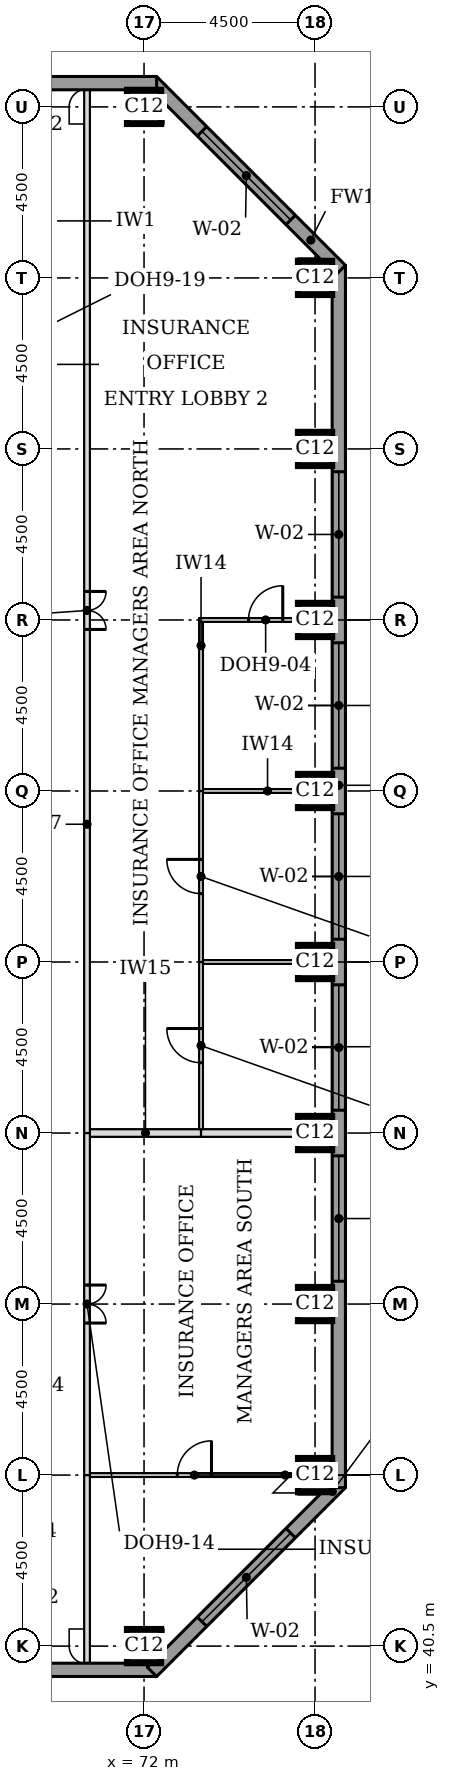
"""IFC4 building model, lengths in metres.
Left out: names, types, materials, properties, quantities, classifications, styles, units other than length and angle.
Written with IfcOpenShell. Run it as: python <this file> out.ifc"""

import sys

from ifc_helpers import new_model, si_unit, direction, frame, frame_2d, origin, origin_2d, place, context, subcontext, project, spatial, rectangle, extrude, element, fill, save


model = new_model("IFC4")
c1 = context("Model", 3, precision=1e-05, world=origin(), true_north=direction((0.0, 1.0)))
c2 = subcontext(c1, "Body", "Model", "MODEL_VIEW")
j1 = project(units=[si_unit("LENGTHUNIT", "METRE"), si_unit("PLANEANGLEUNIT", "RADIAN")], contexts=[c1])
p1 = place(None, origin())
s1 = spatial("IfcSite", under=j1, at=p1, CompositionType="ELEMENT")
p2 = place(p1, origin())
s2 = spatial("IfcBuilding", under=s1, at=p2, CompositionType="ELEMENT")
p3 = place(p2, frame((0.0, 0.0, 219.3)))
s3 = spatial("IfcBuildingStorey", under=s2, at=p3, CompositionType="ELEMENT", Elevation=219.3)
for number, where, z_axis, x_axis in (
    (1, (72.0, 40.5, 0.0), (0.0, 0.0, 1.0), (1.0, 0.0, 0.0)),
    (2, (76.5, 45.0, 0.0), (0.0, 0.0, 1.0), (1.0, 0.0, 0.0)),
    (3, (76.5, 49.5, 0.0), (0.0, 0.0, 1.0), (1.0, 0.0, 0.0)),
    (4, (76.5, 54.0, 0.0), (0.0, 0.0, 1.0), (1.0, 0.0, 0.0)),
    (5, (76.5, 58.5, 0.0), (0.0, 0.0, 1.0), (1.0, 0.0, 0.0)),
    (6, (76.5, 63.0, 0.0), (0.0, 0.0, 1.0), (1.0, 0.0, 0.0)),
    (7, (76.5, 67.5, 0.0), (0.0, 0.0, 1.0), (1.0, 0.0, 0.0)),
    (8, (76.5, 72.0, 0.0), (0.0, 0.0, 1.0), (1.0, 0.0, 0.0)),
    (9, (76.5, 76.5, 0.0), (0.0, 0.0, 1.0), (1.0, 0.0, 0.0)),
    (10, (72.0, 81.0, 0.0), (0.0, 0.0, 1.0), (1.0, 0.0, 0.0)),
):
    element("IfcColumn", number, at=place(p3, frame(where, z_axis=z_axis, x_axis=x_axis)), inside=s3, PredefinedType="COLUMN", context=c2, shape_type="SweptSolid", body=[
        extrude(rectangle(XDim=0.9, YDim=0.9, at=origin_2d()), origin(), (0.0, 0.0, 1.0), 3.7),
    ])
p4 = place(p3, frame((36.0, 39.875, 0.0), z_axis=(0.0, 0.0, 1.0), x_axis=(1.0, 0.0, 0.0)))
e11 = element("IfcWall", 11, at=p4, inside=s3, PredefinedType="STANDARD", context=c2, shape_type="SweptSolid", body=[
    extrude(rectangle(XDim=36.331, YDim=0.35, at=frame_2d((18.166, 0.0))), origin(), (0.0, 0.0, 1.0), 3.525),
])
p5 = place(p4, frame((5.1, 0.0, 0.9)))
e12 = element("IfcOpeningElement", 12, at=p5, cuts=e11, PredefinedType="OPENING", context=c2, shape_type="SweptSolid", body=[
    extrude(rectangle(XDim=3.3, YDim=1.9, at=frame_2d((1.65, 0.95))), frame((0.0, 0.185, 0.0), z_axis=(0.0, -1.0, 0.0), x_axis=(1.0, 0.0, 0.0)), (0.0, 0.0, 1.0), 0.37),
])
p6 = place(p4, frame((9.6, 0.0, 0.9)))
e13 = element("IfcOpeningElement", 13, at=p6, cuts=e11, PredefinedType="OPENING", context=c2, shape_type="SweptSolid", body=[
    extrude(rectangle(XDim=3.3, YDim=1.9, at=frame_2d((1.65, 0.95))), frame((0.0, 0.185, 0.0), z_axis=(0.0, -1.0, 0.0), x_axis=(1.0, 0.0, 0.0)), (0.0, 0.0, 1.0), 0.37),
])
p7 = place(p4, frame((14.1, 0.0, 0.9)))
e14 = element("IfcOpeningElement", 14, at=p7, cuts=e11, PredefinedType="OPENING", context=c2, shape_type="SweptSolid", body=[
    extrude(rectangle(XDim=3.3, YDim=1.9, at=frame_2d((1.65, 0.95))), frame((0.0, 0.185, 0.0), z_axis=(0.0, -1.0, 0.0), x_axis=(1.0, 0.0, 0.0)), (0.0, 0.0, 1.0), 0.37),
])
p8 = place(p4, frame((18.6, 0.0, 0.9)))
e15 = element("IfcOpeningElement", 15, at=p8, cuts=e11, PredefinedType="OPENING", context=c2, shape_type="SweptSolid", body=[
    extrude(rectangle(XDim=3.3, YDim=1.9, at=frame_2d((1.65, 0.95))), frame((0.0, 0.185, 0.0), z_axis=(0.0, -1.0, 0.0), x_axis=(1.0, 0.0, 0.0)), (0.0, 0.0, 1.0), 0.37),
])
p9 = place(p4, frame((23.1, 0.0, 0.9)))
e16 = element("IfcOpeningElement", 16, at=p9, cuts=e11, PredefinedType="OPENING", context=c2, shape_type="SweptSolid", body=[
    extrude(rectangle(XDim=3.3, YDim=1.9, at=frame_2d((1.65, 0.95))), frame((0.0, 0.185, 0.0), z_axis=(0.0, -1.0, 0.0), x_axis=(1.0, 0.0, 0.0)), (0.0, 0.0, 1.0), 0.37),
])
p10 = place(p4, frame((27.6, 0.0, 0.9)))
e17 = element("IfcOpeningElement", 17, at=p10, cuts=e11, PredefinedType="OPENING", context=c2, shape_type="SweptSolid", body=[
    extrude(rectangle(XDim=3.3, YDim=1.9, at=frame_2d((1.65, 0.95))), frame((0.0, 0.185, 0.0), z_axis=(0.0, -1.0, 0.0), x_axis=(1.0, 0.0, 0.0)), (0.0, 0.0, 1.0), 0.37),
])
p11 = place(p3, frame((72.208, 39.824, 0.0), z_axis=(0.0, 0.0, 1.0), x_axis=(0.707106781187, 0.707106781187, 0.0)))
e18 = element("IfcWall", 18, at=p11, inside=s3, PredefinedType="STANDARD", context=c2, shape_type="SweptSolid", body=[
    extrude(rectangle(XDim=7.027, YDim=0.35, at=frame_2d((3.513, 0.0))), origin(), (0.0, 0.0, 1.0), 3.525),
])
p12 = place(p11, frame((1.863, 0.0, 0.9)))
e19 = element("IfcOpeningElement", 19, at=p12, cuts=e18, PredefinedType="OPENING", context=c2, shape_type="SweptSolid", body=[
    extrude(rectangle(XDim=3.3, YDim=1.9, at=frame_2d((1.65, 0.95))), frame((0.0, 0.185, 0.0), z_axis=(0.0, -1.0, 0.0), x_axis=(1.0, 0.0, 0.0)), (0.0, 0.0, 1.0), 0.37),
])
p13 = place(p3, frame((77.125, 44.669, 0.0), z_axis=(0.0, 0.0, 1.0), x_axis=(0.0, 1.0, 0.0)))
e20 = element("IfcWall", 20, at=p13, inside=s3, PredefinedType="STANDARD", context=c2, shape_type="SweptSolid", body=[
    extrude(rectangle(XDim=32.163, YDim=0.35, at=frame_2d((16.081, 0.0))), origin(), (0.0, 0.0, 1.0), 3.525),
])
p14 = place(p13, frame((5.431, 0.0, 0.9)))
e21 = element("IfcOpeningElement", 21, at=p14, cuts=e20, PredefinedType="OPENING", context=c2, shape_type="SweptSolid", body=[
    extrude(rectangle(XDim=3.3, YDim=1.9, at=frame_2d((1.65, 0.95))), frame((0.0, 0.185, 0.0), z_axis=(0.0, -1.0, 0.0), x_axis=(1.0, 0.0, 0.0)), (0.0, 0.0, 1.0), 0.37),
])
p15 = place(p13, frame((9.931, 0.0, 0.9)))
e22 = element("IfcOpeningElement", 22, at=p15, cuts=e20, PredefinedType="OPENING", context=c2, shape_type="SweptSolid", body=[
    extrude(rectangle(XDim=3.3, YDim=1.9, at=frame_2d((1.65, 0.95))), frame((0.0, 0.185, 0.0), z_axis=(0.0, -1.0, 0.0), x_axis=(1.0, 0.0, 0.0)), (0.0, 0.0, 1.0), 0.37),
])
p16 = place(p13, frame((14.431, 0.0, 0.9)))
e23 = element("IfcOpeningElement", 23, at=p16, cuts=e20, PredefinedType="OPENING", context=c2, shape_type="SweptSolid", body=[
    extrude(rectangle(XDim=3.3, YDim=1.9, at=frame_2d((1.65, 0.95))), frame((0.0, 0.185, 0.0), z_axis=(0.0, -1.0, 0.0), x_axis=(1.0, 0.0, 0.0)), (0.0, 0.0, 1.0), 0.37),
])
p17 = place(p13, frame((18.931, 0.0, 0.9)))
e24 = element("IfcOpeningElement", 24, at=p17, cuts=e20, PredefinedType="OPENING", context=c2, shape_type="SweptSolid", body=[
    extrude(rectangle(XDim=3.3, YDim=1.9, at=frame_2d((1.65, 0.95))), frame((0.0, 0.185, 0.0), z_axis=(0.0, -1.0, 0.0), x_axis=(1.0, 0.0, 0.0)), (0.0, 0.0, 1.0), 0.37),
])
p18 = place(p13, frame((23.431, 0.0, 0.9)))
e25 = element("IfcOpeningElement", 25, at=p18, cuts=e20, PredefinedType="OPENING", context=c2, shape_type="SweptSolid", body=[
    extrude(rectangle(XDim=3.3, YDim=1.9, at=frame_2d((1.65, 0.95))), frame((0.0, 0.185, 0.0), z_axis=(0.0, -1.0, 0.0), x_axis=(1.0, 0.0, 0.0)), (0.0, 0.0, 1.0), 0.37),
])
p19 = place(p3, frame((77.176, 76.708, 0.0), z_axis=(0.0, 0.0, 1.0), x_axis=(-0.707106781187, 0.707106781187, 0.0)))
e26 = element("IfcWall", 26, at=p19, inside=s3, PredefinedType="STANDARD", context=c2, shape_type="SweptSolid", body=[
    extrude(rectangle(XDim=7.027, YDim=0.35, at=frame_2d((3.513, 0.0))), origin(), (0.0, 0.0, 1.0), 3.525),
])
p20 = place(p19, frame((1.863, 0.0, 0.9)))
e27 = element("IfcOpeningElement", 27, at=p20, cuts=e26, PredefinedType="OPENING", context=c2, shape_type="SweptSolid", body=[
    extrude(rectangle(XDim=3.3, YDim=1.9, at=frame_2d((1.65, 0.95))), frame((0.0, 0.185, 0.0), z_axis=(0.0, -1.0, 0.0), x_axis=(1.0, 0.0, 0.0)), (0.0, 0.0, 1.0), 0.37),
])
p21 = place(p3, frame((72.331, 81.625, 0.0), z_axis=(0.0, 0.0, 1.0), x_axis=(-1.0, 0.0, 0.0)))
e28 = element("IfcWall", 28, at=p21, inside=s3, PredefinedType="STANDARD", context=c2, shape_type="SweptSolid", body=[
    extrude(rectangle(XDim=32.163, YDim=0.35, at=frame_2d((16.081, 0.0))), origin(), (0.0, 0.0, 1.0), 3.525),
])
p22 = place(p21, frame((5.431, 0.0, 0.9)))
e29 = element("IfcOpeningElement", 29, at=p22, cuts=e28, PredefinedType="OPENING", context=c2, shape_type="SweptSolid", body=[
    extrude(rectangle(XDim=3.3, YDim=1.9, at=frame_2d((1.65, 0.95))), frame((0.0, 0.185, 0.0), z_axis=(0.0, -1.0, 0.0), x_axis=(1.0, 0.0, 0.0)), (0.0, 0.0, 1.0), 0.37),
])
p23 = place(p21, frame((9.931, 0.0, 0.9)))
e30 = element("IfcOpeningElement", 30, at=p23, cuts=e28, PredefinedType="OPENING", context=c2, shape_type="SweptSolid", body=[
    extrude(rectangle(XDim=3.3, YDim=1.9, at=frame_2d((1.65, 0.95))), frame((0.0, 0.185, 0.0), z_axis=(0.0, -1.0, 0.0), x_axis=(1.0, 0.0, 0.0)), (0.0, 0.0, 1.0), 0.37),
])
p24 = place(p21, frame((14.431, 0.0, 0.9)))
e31 = element("IfcOpeningElement", 31, at=p24, cuts=e28, PredefinedType="OPENING", context=c2, shape_type="SweptSolid", body=[
    extrude(rectangle(XDim=3.3, YDim=1.9, at=frame_2d((1.65, 0.95))), frame((0.0, 0.185, 0.0), z_axis=(0.0, -1.0, 0.0), x_axis=(1.0, 0.0, 0.0)), (0.0, 0.0, 1.0), 0.37),
])
p25 = place(p21, frame((18.931, 0.0, 0.9)))
e32 = element("IfcOpeningElement", 32, at=p25, cuts=e28, PredefinedType="OPENING", context=c2, shape_type="SweptSolid", body=[
    extrude(rectangle(XDim=3.3, YDim=1.9, at=frame_2d((1.65, 0.95))), frame((0.0, 0.185, 0.0), z_axis=(0.0, -1.0, 0.0), x_axis=(1.0, 0.0, 0.0)), (0.0, 0.0, 1.0), 0.37),
])
p26 = place(p21, frame((23.431, 0.0, 0.9)))
e33 = element("IfcOpeningElement", 33, at=p26, cuts=e28, PredefinedType="OPENING", context=c2, shape_type="SweptSolid", body=[
    extrude(rectangle(XDim=3.3, YDim=1.9, at=frame_2d((1.65, 0.95))), frame((0.0, 0.185, 0.0), z_axis=(0.0, -1.0, 0.0), x_axis=(1.0, 0.0, 0.0)), (0.0, 0.0, 1.0), 0.37),
])
p27 = place(p3, frame((70.575, 45.0, 0.0), z_axis=(0.0, 0.0, 1.0), x_axis=(1.0, 0.0, 0.0)))
e34 = element("IfcWall", 34, at=p27, inside=s3, PredefinedType="PARTITIONING", context=c2, shape_type="SweptSolid", body=[
    extrude(rectangle(XDim=5.475, YDim=0.1, at=frame_2d((2.738, 0.0))), origin(), (0.0, 0.0, 1.0), 3.096),
])
p28 = place(p27, frame((2.3, 0.0, 0.0)))
e35 = element("IfcOpeningElement", 35, at=p28, cuts=e34, PredefinedType="OPENING", context=c2, shape_type="SweptSolid", body=[
    extrude(rectangle(XDim=0.9, YDim=2.1, at=frame_2d((0.45, 1.05))), frame((0.0, 0.06, 0.0), z_axis=(0.0, -1.0, 0.0), x_axis=(1.0, 0.0, 0.0)), (0.0, 0.0, 1.0), 0.12),
])
p29 = place(p3, frame((70.575, 54.0, 0.0), z_axis=(0.0, 0.0, 1.0), x_axis=(1.0, 0.0, 0.0)))
e36 = element("IfcWall", 36, at=p29, inside=s3, PredefinedType="PARTITIONING", context=c2, shape_type="SweptSolid", body=[
    extrude(rectangle(XDim=2.925, YDim=0.2, at=frame_2d((1.462, 0.0))), origin(), (0.0, 0.0, 1.0), 3.55),
])
p30 = place(p3, frame((73.5, 54.0, 0.0), z_axis=(0.0, 0.0, 1.0), x_axis=(1.0, 0.0, 0.0)))
e37 = element("IfcWall", 37, at=p30, inside=s3, PredefinedType="PARTITIONING", context=c2, shape_type="SweptSolid", body=[
    extrude(rectangle(XDim=3.45, YDim=0.2, at=frame_2d((1.725, 0.0))), origin(), (0.0, 0.0, 1.0), 3.55),
])
for number, where, z_axis, x_axis in (
    (38, (73.55, 58.5, 0.0), (0.0, 0.0, 1.0), (1.0, 0.0, 0.0)),
    (39, (73.55, 63.0, 0.0), (0.0, 0.0, 1.0), (1.0, 0.0, 0.0)),
):
    element("IfcWall", number, at=place(p3, frame(where, z_axis=z_axis, x_axis=x_axis)), inside=s3, PredefinedType="PARTITIONING", context=c2, shape_type="SweptSolid", body=[
        extrude(rectangle(XDim=3.4, YDim=0.1, at=frame_2d((1.7, 0.0))), origin(), (0.0, 0.0, 1.0), 3.55),
    ])
p31 = place(p3, frame((73.45, 67.5, 0.0), z_axis=(0.0, 0.0, 1.0), x_axis=(1.0, 0.0, 0.0)))
e40 = element("IfcWall", 40, at=p31, inside=s3, PredefinedType="PARTITIONING", context=c2, shape_type="SweptSolid", body=[
    extrude(rectangle(XDim=3.5, YDim=0.1, at=frame_2d((1.75, 0.0))), origin(), (0.0, 0.0, 1.0), 3.55),
])
p32 = place(p31, frame((1.3, 0.0, 0.0)))
e41 = element("IfcOpeningElement", 41, at=p32, cuts=e40, PredefinedType="OPENING", context=c2, shape_type="SweptSolid", body=[
    extrude(rectangle(XDim=0.9, YDim=2.1, at=frame_2d((0.45, 1.05))), frame((0.0, 0.06, 0.0), z_axis=(0.0, -1.0, 0.0), x_axis=(1.0, 0.0, 0.0)), (0.0, 0.0, 1.0), 0.12),
])
p33 = place(p3, frame((70.5, 40.05, 0.0), z_axis=(0.0, 0.0, 1.0), x_axis=(0.0, 1.0, 0.0)))
e42 = element("IfcWall", 42, at=p33, inside=s3, PredefinedType="PARTITIONING", context=c2, shape_type="SweptSolid", body=[
    extrude(rectangle(XDim=4.95, YDim=0.15, at=frame_2d((2.475, 0.0))), origin(), (0.0, 0.0, 1.0), 3.55),
])
p34 = place(p3, frame((70.5, 45.0, 0.0), z_axis=(0.0, 0.0, 1.0), x_axis=(0.0, 1.0, 0.0)))
e43 = element("IfcWall", 43, at=p34, inside=s3, PredefinedType="PARTITIONING", context=c2, shape_type="SweptSolid", body=[
    extrude(rectangle(XDim=9.0, YDim=0.15, at=frame_2d((4.5, 0.0))), origin(), (0.0, 0.0, 1.0), 3.55),
])
p35 = place(p34, frame((4.0, 0.0, 0.0)))
e44 = element("IfcOpeningElement", 44, at=p35, cuts=e43, PredefinedType="OPENING", context=c2, shape_type="SweptSolid", body=[
    extrude(rectangle(XDim=1.0, YDim=2.1, at=frame_2d((0.5, 1.05))), frame((0.0, 0.085, 0.0), z_axis=(0.0, -1.0, 0.0), x_axis=(1.0, 0.0, 0.0)), (0.0, 0.0, 1.0), 0.17),
])
p36 = place(p3, frame((70.5, 54.0, 0.0), z_axis=(0.0, 0.0, 1.0), x_axis=(0.0, 1.0, 0.0)))
e45 = element("IfcWall", 45, at=p36, inside=s3, PredefinedType="PARTITIONING", context=c2, shape_type="SweptSolid", body=[
    extrude(rectangle(XDim=27.45, YDim=0.15, at=frame_2d((13.725, 0.0))), origin(), (0.0, 0.0, 1.0), 3.55),
])
p37 = place(p36, frame((13.25, 0.0, 0.0)))
e46 = element("IfcOpeningElement", 46, at=p37, cuts=e45, PredefinedType="OPENING", context=c2, shape_type="SweptSolid", body=[
    extrude(rectangle(XDim=1.0, YDim=2.1, at=frame_2d((0.5, 1.05))), frame((0.0, 0.085, 0.0), z_axis=(0.0, -1.0, 0.0), x_axis=(1.0, 0.0, 0.0)), (0.0, 0.0, 1.0), 0.17),
])
p38 = place(p3, frame((73.5, 54.1, 0.0), z_axis=(0.0, 0.0, 1.0), x_axis=(0.0, 1.0, 0.0)))
e47 = element("IfcWall", 47, at=p38, inside=s3, PredefinedType="PARTITIONING", context=c2, shape_type="SweptSolid", body=[
    extrude(rectangle(XDim=4.4, YDim=0.1, at=frame_2d((2.2, 0.0))), origin(), (0.0, 0.0, 1.0), 3.55),
])
p39 = place(p38, frame((1.75, 0.0, 0.0)))
e48 = element("IfcOpeningElement", 48, at=p39, cuts=e47, PredefinedType="OPENING", context=c2, shape_type="SweptSolid", body=[
    extrude(rectangle(XDim=0.9, YDim=2.1, at=frame_2d((0.45, 1.05))), frame((0.0, 0.06, 0.0), z_axis=(0.0, -1.0, 0.0), x_axis=(1.0, 0.0, 0.0)), (0.0, 0.0, 1.0), 0.12),
])
p40 = place(p3, frame((73.5, 58.5, 0.0), z_axis=(0.0, 0.0, 1.0), x_axis=(0.0, 1.0, 0.0)))
e49 = element("IfcWall", 49, at=p40, inside=s3, PredefinedType="PARTITIONING", context=c2, shape_type="SweptSolid", body=[
    extrude(rectangle(XDim=4.5, YDim=0.1, at=frame_2d((2.25, 0.0))), origin(), (0.0, 0.0, 1.0), 3.55),
])
p41 = place(p40, frame((1.8, 0.0, 0.0)))
e50 = element("IfcOpeningElement", 50, at=p41, cuts=e49, PredefinedType="OPENING", context=c2, shape_type="SweptSolid", body=[
    extrude(rectangle(XDim=0.9, YDim=2.1, at=frame_2d((0.45, 1.05))), frame((0.0, 0.06, 0.0), z_axis=(0.0, -1.0, 0.0), x_axis=(1.0, 0.0, 0.0)), (0.0, 0.0, 1.0), 0.12),
])
p42 = place(p3, frame((73.5, 63.0, 0.0), z_axis=(0.0, 0.0, 1.0), x_axis=(0.0, 1.0, 0.0)))
e51 = element("IfcWall", 51, at=p42, inside=s3, PredefinedType="PARTITIONING", context=c2, shape_type="SweptSolid", body=[
    extrude(rectangle(XDim=4.45, YDim=0.1, at=frame_2d((2.225, 0.0))), origin(), (0.0, 0.0, 1.0), 3.55),
])
p43 = place(p12, origin())
e52 = element("IfcWindow", 52, at=p43, inside=s3, PartitioningType="SINGLE_PANEL", PredefinedType="WINDOW", context=c2, shape_type="SweptSolid", body=[
    extrude(rectangle(XDim=3.3, YDim=1.9, at=frame_2d((1.65, 0.95))), frame((0.0, 0.085, 0.0), z_axis=(0.0, -1.0, 0.0), x_axis=(1.0, 0.0, 0.0)), (0.0, 0.0, 1.0), 0.06),
])
fill(e19, e52)
p44 = place(p14, origin())
e53 = element("IfcWindow", 53, at=p44, inside=s3, PartitioningType="SINGLE_PANEL", PredefinedType="WINDOW", context=c2, shape_type="SweptSolid", body=[
    extrude(rectangle(XDim=3.3, YDim=1.9, at=frame_2d((1.65, 0.95))), frame((0.0, 0.085, 0.0), z_axis=(0.0, -1.0, 0.0), x_axis=(1.0, 0.0, 0.0)), (0.0, 0.0, 1.0), 0.06),
])
fill(e21, e53)
p45 = place(p15, origin())
e54 = element("IfcWindow", 54, at=p45, inside=s3, PartitioningType="SINGLE_PANEL", PredefinedType="WINDOW", context=c2, shape_type="SweptSolid", body=[
    extrude(rectangle(XDim=3.3, YDim=1.9, at=frame_2d((1.65, 0.95))), frame((0.0, 0.085, 0.0), z_axis=(0.0, -1.0, 0.0), x_axis=(1.0, 0.0, 0.0)), (0.0, 0.0, 1.0), 0.06),
])
fill(e22, e54)
p46 = place(p16, origin())
e55 = element("IfcWindow", 55, at=p46, inside=s3, PartitioningType="SINGLE_PANEL", PredefinedType="WINDOW", context=c2, shape_type="SweptSolid", body=[
    extrude(rectangle(XDim=3.3, YDim=1.9, at=frame_2d((1.65, 0.95))), frame((0.0, 0.085, 0.0), z_axis=(0.0, -1.0, 0.0), x_axis=(1.0, 0.0, 0.0)), (0.0, 0.0, 1.0), 0.06),
])
fill(e23, e55)
p47 = place(p17, origin())
e56 = element("IfcWindow", 56, at=p47, inside=s3, PartitioningType="SINGLE_PANEL", PredefinedType="WINDOW", context=c2, shape_type="SweptSolid", body=[
    extrude(rectangle(XDim=3.3, YDim=1.9, at=frame_2d((1.65, 0.95))), frame((0.0, 0.085, 0.0), z_axis=(0.0, -1.0, 0.0), x_axis=(1.0, 0.0, 0.0)), (0.0, 0.0, 1.0), 0.06),
])
fill(e24, e56)
p48 = place(p18, origin())
e57 = element("IfcWindow", 57, at=p48, inside=s3, PartitioningType="SINGLE_PANEL", PredefinedType="WINDOW", context=c2, shape_type="SweptSolid", body=[
    extrude(rectangle(XDim=3.3, YDim=1.9, at=frame_2d((1.65, 0.95))), frame((0.0, 0.085, 0.0), z_axis=(0.0, -1.0, 0.0), x_axis=(1.0, 0.0, 0.0)), (0.0, 0.0, 1.0), 0.06),
])
fill(e25, e57)
p49 = place(p20, origin())
e58 = element("IfcWindow", 58, at=p49, inside=s3, PartitioningType="SINGLE_PANEL", PredefinedType="WINDOW", context=c2, shape_type="SweptSolid", body=[
    extrude(rectangle(XDim=3.3, YDim=1.9, at=frame_2d((1.65, 0.95))), frame((0.0, 0.085, 0.0), z_axis=(0.0, -1.0, 0.0), x_axis=(1.0, 0.0, 0.0)), (0.0, 0.0, 1.0), 0.06),
])
fill(e27, e58)
p50 = place(p35, frame((1.0, 0.0, 0.0), z_axis=(0.0, 0.0, 1.0), x_axis=(-1.0, 0.0, 0.0)))
e59 = element("IfcDoor", 59, at=p50, inside=s3, OperationType="DOUBLE_DOOR_SINGLE_SWING", PredefinedType="DOOR", context=c2, shape_type="SweptSolid", body=[
    extrude(rectangle(XDim=1.0, YDim=2.1, at=frame_2d((0.5, 1.05))), frame((0.0, 0.025, 0.0), z_axis=(0.0, -1.0, 0.0), x_axis=(1.0, 0.0, 0.0)), (0.0, 0.0, 1.0), 0.05),
])
fill(e44, e59)
p51 = place(p28, origin())
e60 = element("IfcDoor", 60, at=p51, inside=s3, OperationType="SINGLE_SWING_RIGHT", PredefinedType="DOOR", context=c2, shape_type="SweptSolid", body=[
    extrude(rectangle(XDim=0.9, YDim=2.1, at=frame_2d((0.45, 1.05))), frame((0.0, 0.025, 0.0), z_axis=(0.0, -1.0, 0.0), x_axis=(1.0, 0.0, 0.0)), (0.0, 0.0, 1.0), 0.05),
])
fill(e35, e60)
p52 = place(p37, frame((1.0, 0.0, 0.0), z_axis=(0.0, 0.0, 1.0), x_axis=(-1.0, 0.0, 0.0)))
e61 = element("IfcDoor", 61, at=p52, inside=s3, OperationType="DOUBLE_DOOR_SINGLE_SWING", PredefinedType="DOOR", context=c2, shape_type="SweptSolid", body=[
    extrude(rectangle(XDim=1.0, YDim=2.1, at=frame_2d((0.5, 1.05))), frame((0.0, 0.025, 0.0), z_axis=(0.0, -1.0, 0.0), x_axis=(1.0, 0.0, 0.0)), (0.0, 0.0, 1.0), 0.05),
])
fill(e46, e61)
p53 = place(p39, origin())
e62 = element("IfcDoor", 62, at=p53, inside=s3, OperationType="SINGLE_SWING_RIGHT", PredefinedType="DOOR", context=c2, shape_type="SweptSolid", body=[
    extrude(rectangle(XDim=0.9, YDim=2.1, at=frame_2d((0.45, 1.05))), frame((0.0, 0.025, 0.0), z_axis=(0.0, -1.0, 0.0), x_axis=(1.0, 0.0, 0.0)), (0.0, 0.0, 1.0), 0.05),
])
fill(e48, e62)
p54 = place(p41, origin())
e63 = element("IfcDoor", 63, at=p54, inside=s3, OperationType="SINGLE_SWING_RIGHT", PredefinedType="DOOR", context=c2, shape_type="SweptSolid", body=[
    extrude(rectangle(XDim=0.9, YDim=2.1, at=frame_2d((0.45, 1.05))), frame((0.0, 0.025, 0.0), z_axis=(0.0, -1.0, 0.0), x_axis=(1.0, 0.0, 0.0)), (0.0, 0.0, 1.0), 0.05),
])
fill(e50, e63)
p55 = place(p32, origin())
e64 = element("IfcDoor", 64, at=p55, inside=s3, OperationType="SINGLE_SWING_RIGHT", PredefinedType="DOOR", context=c2, shape_type="SweptSolid", body=[
    extrude(rectangle(XDim=0.9, YDim=2.1, at=frame_2d((0.45, 1.05))), frame((0.0, 0.025, 0.0), z_axis=(0.0, -1.0, 0.0), x_axis=(1.0, 0.0, 0.0)), (0.0, 0.0, 1.0), 0.05),
])
fill(e41, e64)
save(model, sys.argv[1])
